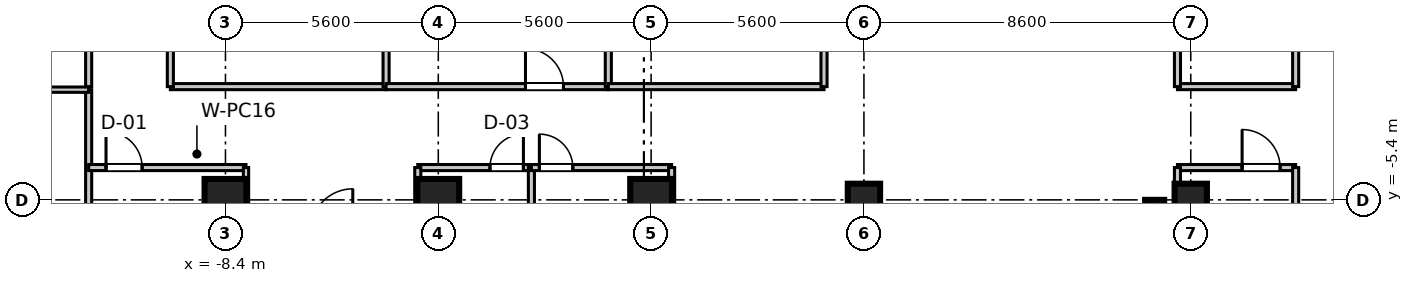
"""IFC4 building model, lengths in metres.
Left out: names, types, materials, properties, quantities, classifications, styles, units other than length and angle.
Written with IfcOpenShell. Run it as: python <this file> out.ifc"""

import sys

from ifc_helpers import new_model, si_unit, direction, frame, frame_2d, origin, origin_2d, place, context, subcontext, project, spatial, rectangle, extrude, source, transform, mapped, element, fill, save


model = new_model("IFC4")
c1 = context("Model", 3, precision=1e-05, world=origin(), true_north=direction((0.0, 1.0)))
c2 = subcontext(c1, "Body", "Model", "MODEL_VIEW")
j1 = project(units=[si_unit("LENGTHUNIT", "METRE"), si_unit("PLANEANGLEUNIT", "RADIAN")], contexts=[c1])
p1 = place(None, origin())
s1 = spatial("IfcSite", under=j1, at=p1, CompositionType="ELEMENT")
p2 = place(p1, origin())
s2 = spatial("IfcBuilding", under=s1, at=p2, CompositionType="ELEMENT")
p3 = place(p2, frame((0.0, 0.0, 156.3)))
s3 = spatial("IfcBuildingStorey", under=s2, at=p3, CompositionType="ELEMENT", Elevation=156.3)
m1 = source(origin(), c2, "Body", "SweptSolid", [
    extrude(rectangle(XDim=1.1, YDim=1.1, at=origin_2d()), origin(), (0.0, 0.0, 1.0), 3.605),
])
for number, where, z_axis, x_axis in (
    (1, (-8.4, -5.4, 0.0), (0.0, 0.0, 1.0), (1.0, 0.0, 0.0)),
    (2, (-2.8, -5.4, 0.0), (0.0, 0.0, 1.0), (1.0, 0.0, 0.0)),
    (3, (2.8, -5.4, 0.0), (0.0, 0.0, 1.0), (1.0, 0.0, 0.0)),
):
    element("IfcColumn", number, at=place(p3, frame(where, z_axis=z_axis, x_axis=x_axis)), inside=s3, PredefinedType="COLUMN", context=c2, shape_type="MappedRepresentation", body=[
        mapped(m1, transform((0.0, 0.0, 0.0), scale=1.0)),
    ])
m2 = source(origin(), c2, "Body", "SweptSolid", [
    extrude(rectangle(XDim=0.85, YDim=0.85, at=origin_2d()), origin(), (0.0, 0.0, 1.0), 3.605),
])
for number, where, z_axis, x_axis in (
    (4, (8.4, -5.4, 0.0), (0.0, 0.0, 1.0), (1.0, 0.0, 0.0)),
    (5, (17.0, -5.4, 0.0), (0.0, 0.0, 1.0), (1.0, 0.0, 0.0)),
):
    element("IfcColumn", number, at=place(p3, frame(where, z_axis=z_axis, x_axis=x_axis)), inside=s3, PredefinedType="PILASTER", context=c2, shape_type="MappedRepresentation", body=[
        mapped(m2, transform((0.0, 0.0, 0.0), scale=1.0)),
    ])
m3 = source(origin(), c2, "Body", "SweptSolid", [
    extrude(rectangle(XDim=11.6, YDim=0.5, at=frame_2d((5.8, 0.0))), origin(), (0.0, 0.0, 1.0), 3.39),
])
p4 = place(p3, frame((16.05, -17.0, 0.0), z_axis=(0.0, 0.0, 1.0), x_axis=(0.0, 1.0, 0.0)))
e6 = element("IfcWall", 6, at=p4, inside=s3, PredefinedType="SHEAR", context=c2, shape_type="MappedRepresentation", body=[
    mapped(m3, transform((0.0, 0.0, 0.0), scale=1.0)),
])
m4 = source(origin(), c2, "Body", "SweptSolid", [
    extrude(rectangle(XDim=3.11, YDim=0.16, at=frame_2d((1.555, 0.0))), origin(), (0.0, 0.0, 1.0), 2.73),
])
p5 = place(p3, frame((16.65, -4.55, 0.0), z_axis=(0.0, 0.0, 1.0), x_axis=(1.0, 0.0, 0.0)))
e7 = element("IfcWall", 7, at=p5, inside=s3, PredefinedType="PARTITIONING", context=c2, shape_type="MappedRepresentation", body=[
    mapped(m4, transform((0.0, 0.0, 0.0), scale=1.0)),
])
p6 = place(p5, frame((1.701, 0.0, 0.0)))
e8 = element("IfcOpeningElement", 8, at=p6, cuts=e7, PredefinedType="OPENING", context=c2, shape_type="SweptSolid", body=[
    extrude(rectangle(XDim=1.0, YDim=2.1, at=frame_2d((0.5, 1.05))), frame((0.0, 0.09, 0.0), z_axis=(0.0, -1.0, 0.0), x_axis=(1.0, 0.0, 0.0)), (0.0, 0.0, 1.0), 0.18),
])
m5 = source(origin(), c2, "Body", "SweptSolid", [
    extrude(rectangle(XDim=17.95, YDim=0.16, at=frame_2d((8.975, 0.0))), origin(), (0.0, 0.0, 1.0), 2.73),
])
p7 = place(p3, frame((16.65, -22.5, 0.0), z_axis=(0.0, 0.0, 1.0), x_axis=(0.0, 1.0, 0.0)))
e9 = element("IfcWall", 9, at=p7, inside=s3, PredefinedType="PARTITIONING", context=c2, shape_type="MappedRepresentation", body=[
    mapped(m5, transform((0.0, 0.0, 0.0), scale=1.0)),
])
m6 = source(origin(), c2, "Body", "SweptSolid", [
    extrude(rectangle(XDim=16.53, YDim=0.16, at=frame_2d((8.265, 0.0))), origin(), (0.0, 0.0, 1.0), 2.73),
])
p8 = place(p3, frame((19.76, -21.08, 0.0), z_axis=(0.0, 0.0, 1.0), x_axis=(0.0, 1.0, 0.0)))
e10 = element("IfcWall", 10, at=p8, inside=s3, PredefinedType="PARTITIONING", context=c2, shape_type="MappedRepresentation", body=[
    mapped(m6, transform((0.0, 0.0, 0.0), scale=1.0)),
])
m7 = source(origin(), c2, "Body", "SweptSolid", [
    extrude(rectangle(XDim=20.0, YDim=0.16, at=frame_2d((10.0, 0.0))), origin(), (0.0, 0.0, 1.0), 2.73),
])
p9 = place(p3, frame((-12.0, -22.5, 0.0), z_axis=(0.0, 0.0, 1.0), x_axis=(0.0, 1.0, 0.0)))
e11 = element("IfcWall", 11, at=p9, inside=s3, PredefinedType="PARTITIONING", context=c2, shape_type="MappedRepresentation", body=[
    mapped(m7, transform((0.0, 0.0, 0.0), scale=1.0)),
])
p10 = place(p9, frame((10.785, 0.0, 0.0)))
e12 = element("IfcOpeningElement", 12, at=p10, cuts=e11, PredefinedType="OPENING", context=c2, shape_type="SweptSolid", body=[
    extrude(rectangle(XDim=0.95, YDim=2.1, at=frame_2d((0.475, 1.05))), frame((0.0, 0.09, 0.0), z_axis=(0.0, -1.0, 0.0), x_axis=(1.0, 0.0, 0.0)), (0.0, 0.0, 1.0), 0.18),
])
m8 = source(origin(), c2, "Body", "SweptSolid", [
    extrude(rectangle(XDim=7.76, YDim=0.14, at=frame_2d((3.88, 0.0))), origin(), (0.0, 0.0, 1.0), 2.73),
])
p11 = place(p3, frame((-19.76, -2.5, 0.0), z_axis=(0.0, 0.0, 1.0), x_axis=(1.0, 0.0, 0.0)))
e13 = element("IfcWall", 13, at=p11, inside=s3, PredefinedType="PARTITIONING", context=c2, shape_type="MappedRepresentation", body=[
    mapped(m8, transform((0.0, 0.0, 0.0), scale=1.0)),
])
m9 = source(origin(), c2, "Body", "SweptSolid", [
    extrude(rectangle(XDim=4.14, YDim=0.16, at=frame_2d((2.07, 0.0))), origin(), (0.0, 0.0, 1.0), 2.73),
])
p12 = place(p3, frame((-12.0, -4.55, 0.0), z_axis=(0.0, 0.0, 1.0), x_axis=(1.0, 0.0, 0.0)))
e14 = element("IfcWall", 14, at=p12, inside=s3, PredefinedType="PARTITIONING", context=c2, shape_type="MappedRepresentation", body=[
    mapped(m9, transform((0.0, 0.0, 0.0), scale=1.0)),
])
p13 = place(p12, frame((0.457, 0.0, 0.0)))
e15 = element("IfcOpeningElement", 15, at=p13, cuts=e14, PredefinedType="OPENING", context=c2, shape_type="SweptSolid", body=[
    extrude(rectangle(XDim=0.95, YDim=2.1, at=frame_2d((0.475, 1.05))), frame((0.0, 0.09, 0.0), z_axis=(0.0, -1.0, 0.0), x_axis=(1.0, 0.0, 0.0)), (0.0, 0.0, 1.0), 0.18),
])
m10 = source(origin(), c2, "Body", "SweptSolid", [
    extrude(rectangle(XDim=17.95, YDim=0.14, at=frame_2d((8.975, 0.0))), origin(), (0.0, 0.0, 1.0), 2.73),
])
p14 = place(p3, frame((-7.86, -22.5, 0.0), z_axis=(0.0, 0.0, 1.0), x_axis=(0.0, 1.0, 0.0)))
e16 = element("IfcWall", 16, at=p14, inside=s3, PredefinedType="PARTITIONING", context=c2, shape_type="MappedRepresentation", body=[
    mapped(m10, transform((0.0, 0.0, 0.0), scale=1.0)),
])
m11 = source(origin(), c2, "Body", "SweptSolid", [
    extrude(rectangle(XDim=2.99, YDim=0.16, at=frame_2d((1.495, 0.0))), origin(), (0.0, 0.0, 1.0), 2.73),
])
p15 = place(p3, frame((-3.34, -4.55, 0.0), z_axis=(0.0, 0.0, 1.0), x_axis=(1.0, 0.0, 0.0)))
e17 = element("IfcWall", 17, at=p15, inside=s3, PredefinedType="PARTITIONING", context=c2, shape_type="MappedRepresentation", body=[
    mapped(m11, transform((0.0, 0.0, 0.0), scale=1.0)),
])
p16 = place(p15, frame((1.9, 0.0, 0.0)))
e18 = element("IfcOpeningElement", 18, at=p16, cuts=e17, PredefinedType="OPENING", context=c2, shape_type="SweptSolid", body=[
    extrude(rectangle(XDim=0.88, YDim=2.1, at=frame_2d((0.44, 1.05))), frame((0.0, 0.09, 0.0), z_axis=(0.0, -1.0, 0.0), x_axis=(1.0, 0.0, 0.0)), (0.0, 0.0, 1.0), 0.18),
])
for number, where, z_axis, x_axis in (
    (19, (-3.34, -22.5, 0.0), (0.0, 0.0, 1.0), (0.0, 1.0, 0.0)),
    (20, (-0.35, -22.5, 0.0), (0.0, 0.0, 1.0), (0.0, 1.0, 0.0)),
):
    element("IfcWall", number, at=place(p3, frame(where, z_axis=z_axis, x_axis=x_axis)), inside=s3, PredefinedType="PARTITIONING", context=c2, shape_type="MappedRepresentation", body=[
        mapped(m5, transform((0.0, 0.0, 0.0), scale=1.0)),
    ])
m12 = source(origin(), c2, "Body", "SweptSolid", [
    extrude(rectangle(XDim=3.69, YDim=0.16, at=frame_2d((1.845, 0.0))), origin(), (0.0, 0.0, 1.0), 2.73),
])
p17 = place(p3, frame((-0.35, -4.55, 0.0), z_axis=(0.0, 0.0, 1.0), x_axis=(1.0, 0.0, 0.0)))
e21 = element("IfcWall", 21, at=p17, inside=s3, PredefinedType="PARTITIONING", context=c2, shape_type="MappedRepresentation", body=[
    mapped(m12, transform((0.0, 0.0, 0.0), scale=1.0)),
])
p18 = place(p17, frame((0.21, 0.0, 0.0)))
e22 = element("IfcOpeningElement", 22, at=p18, cuts=e21, PredefinedType="OPENING", context=c2, shape_type="SweptSolid", body=[
    extrude(rectangle(XDim=0.88, YDim=2.1, at=frame_2d((0.44, 1.05))), frame((0.0, 0.09, 0.0), z_axis=(0.0, -1.0, 0.0), x_axis=(1.0, 0.0, 0.0)), (0.0, 0.0, 1.0), 0.18),
])
p19 = place(p3, frame((3.34, -22.5, 0.0), z_axis=(0.0, 0.0, 1.0), x_axis=(0.0, 1.0, 0.0)))
e23 = element("IfcWall", 23, at=p19, inside=s3, PredefinedType="PARTITIONING", context=c2, shape_type="MappedRepresentation", body=[
    mapped(m5, transform((0.0, 0.0, 0.0), scale=1.0)),
])
m13 = source(origin(), c2, "Body", "SweptSolid", [
    extrude(rectangle(XDim=4.84, YDim=0.16, at=frame_2d((2.42, 0.0))), origin(), (0.0, 0.0, 1.0), 2.73),
])
p20 = place(p3, frame((-12.0, -2.42, 0.0), z_axis=(0.0, 0.0, 1.0), x_axis=(0.0, 1.0, 0.0)))
e24 = element("IfcWall", 24, at=p20, inside=s3, PredefinedType="PARTITIONING", context=c2, shape_type="MappedRepresentation", body=[
    mapped(m13, transform((0.0, 0.0, 0.0), scale=1.0)),
])
p21 = place(p20, frame((1.945, 0.0, 0.0)))
e25 = element("IfcOpeningElement", 25, at=p21, cuts=e24, PredefinedType="OPENING", context=c2, shape_type="SweptSolid", body=[
    extrude(rectangle(XDim=0.95, YDim=2.1, at=frame_2d((0.475, 1.05))), frame((0.0, 0.09, 0.0), z_axis=(0.0, -1.0, 0.0), x_axis=(1.0, 0.0, 0.0)), (0.0, 0.0, 1.0), 0.18),
])
m14 = source(origin(), c2, "Body", "SweptSolid", [
    extrude(rectangle(XDim=5.676, YDim=0.16, at=frame_2d((2.838, 0.0))), origin(), (0.0, 0.0, 1.0), 2.73),
])
p22 = place(p3, frame((-9.85, -2.42, 0.0), z_axis=(0.0, 0.0, 1.0), x_axis=(1.0, 0.0, 0.0)))
e26 = element("IfcWall", 26, at=p22, inside=s3, PredefinedType="PARTITIONING", context=c2, shape_type="MappedRepresentation", body=[
    mapped(m14, transform((0.0, 0.0, 0.0), scale=1.0)),
])
for number, where, z_axis, x_axis in (
    (27, (-9.85, -2.42, 0.0), (0.0, 0.0, 1.0), (0.0, 1.0, 0.0)),
    (28, (-4.174, -2.42, 0.0), (0.0, 0.0, 1.0), (0.0, 1.0, 0.0)),
):
    element("IfcWall", number, at=place(p3, frame(where, z_axis=z_axis, x_axis=x_axis)), inside=s3, PredefinedType="PARTITIONING", context=c2, shape_type="MappedRepresentation", body=[
        mapped(m13, transform((0.0, 0.0, 0.0), scale=1.0)),
    ])
m15 = source(origin(), c2, "Body", "SweptSolid", [
    extrude(rectangle(XDim=5.848, YDim=0.16, at=frame_2d((2.924, 0.0))), origin(), (0.0, 0.0, 1.0), 2.73),
])
p23 = place(p3, frame((-4.174, -2.42, 0.0), z_axis=(0.0, 0.0, 1.0), x_axis=(1.0, 0.0, 0.0)))
e29 = element("IfcWall", 29, at=p23, inside=s3, PredefinedType="PARTITIONING", context=c2, shape_type="MappedRepresentation", body=[
    mapped(m15, transform((0.0, 0.0, 0.0), scale=1.0)),
])
p24 = place(p23, frame((3.668, 0.0, 0.0)))
e30 = element("IfcOpeningElement", 30, at=p24, cuts=e29, PredefinedType="OPENING", context=c2, shape_type="SweptSolid", body=[
    extrude(rectangle(XDim=1.0, YDim=2.1, at=frame_2d((0.5, 1.05))), frame((0.0, 0.09, 0.0), z_axis=(0.0, -1.0, 0.0), x_axis=(1.0, 0.0, 0.0)), (0.0, 0.0, 1.0), 0.18),
])
p25 = place(p3, frame((1.674, -2.42, 0.0), z_axis=(0.0, 0.0, 1.0), x_axis=(0.0, 1.0, 0.0)))
e31 = element("IfcWall", 31, at=p25, inside=s3, PredefinedType="PARTITIONING", context=c2, shape_type="MappedRepresentation", body=[
    mapped(m13, transform((0.0, 0.0, 0.0), scale=1.0)),
])
p26 = place(p3, frame((1.674, -2.42, 0.0), z_axis=(0.0, 0.0, 1.0), x_axis=(1.0, 0.0, 0.0)))
e32 = element("IfcWall", 32, at=p26, inside=s3, PredefinedType="PARTITIONING", context=c2, shape_type="MappedRepresentation", body=[
    mapped(m14, transform((0.0, 0.0, 0.0), scale=1.0)),
])
p27 = place(p3, frame((7.35, -2.42, 0.0), z_axis=(0.0, 0.0, 1.0), x_axis=(0.0, 1.0, 0.0)))
e33 = element("IfcWall", 33, at=p27, inside=s3, PredefinedType="PARTITIONING", context=c2, shape_type="MappedRepresentation", body=[
    mapped(m13, transform((0.0, 0.0, 0.0), scale=1.0)),
])
p28 = place(p3, frame((16.65, -2.42, 0.0), z_axis=(0.0, 0.0, 1.0), x_axis=(1.0, 0.0, 0.0)))
e34 = element("IfcWall", 34, at=p28, inside=s3, PredefinedType="PARTITIONING", context=c2, shape_type="MappedRepresentation", body=[
    mapped(m4, transform((0.0, 0.0, 0.0), scale=1.0)),
])
for number, where, z_axis, x_axis in (
    (35, (16.65, -2.42, 0.0), (0.0, 0.0, 1.0), (0.0, 1.0, 0.0)),
    (36, (19.76, -2.42, 0.0), (0.0, 0.0, 1.0), (0.0, 1.0, 0.0)),
):
    element("IfcWall", number, at=place(p3, frame(where, z_axis=z_axis, x_axis=x_axis)), inside=s3, PredefinedType="PARTITIONING", context=c2, shape_type="MappedRepresentation", body=[
        mapped(m13, transform((0.0, 0.0, 0.0), scale=1.0)),
    ])
m16 = source(origin(), c2, "Body", "SweptSolid", [
    extrude(rectangle(XDim=1.0, YDim=2.1, at=frame_2d((0.5, 1.05))), frame((0.0, 0.025, 0.0), z_axis=(0.0, -1.0, 0.0), x_axis=(1.0, 0.0, 0.0)), (0.0, 0.0, 1.0), 0.05),
])
p29 = place(p6, frame((1.0, 0.0, 0.0), z_axis=(0.0, 0.0, 1.0), x_axis=(-1.0, 0.0, 0.0)))
e37 = element("IfcDoor", 37, at=p29, inside=s3, OperationType="SINGLE_SWING_LEFT", PredefinedType="DOOR", context=c2, shape_type="MappedRepresentation", body=[
    mapped(m16, transform((0.0, 0.0, 0.0), scale=1.0)),
])
fill(e8, e37)
m17 = source(origin(), c2, "Body", "SweptSolid", [
    extrude(rectangle(XDim=0.95, YDim=2.1, at=frame_2d((0.475, 1.05))), frame((0.0, 0.025, 0.0), z_axis=(0.0, -1.0, 0.0), x_axis=(1.0, 0.0, 0.0)), (0.0, 0.0, 1.0), 0.05),
])
p30 = place(p13, frame((0.95, 0.0, 0.0), z_axis=(0.0, 0.0, 1.0), x_axis=(-1.0, 0.0, 0.0)))
e38 = element("IfcDoor", 38, at=p30, inside=s3, OperationType="SINGLE_SWING_LEFT", PredefinedType="DOOR", context=c2, shape_type="MappedRepresentation", body=[
    mapped(m17, transform((0.0, 0.0, 0.0), scale=1.0)),
])
fill(e15, e38)
m18 = source(origin(), c2, "Body", "SweptSolid", [
    extrude(rectangle(XDim=0.88, YDim=2.1, at=frame_2d((0.44, 1.05))), frame((0.0, 0.025, 0.0), z_axis=(0.0, -1.0, 0.0), x_axis=(1.0, 0.0, 0.0)), (0.0, 0.0, 1.0), 0.05),
])
p31 = place(p16, frame((0.88, 0.0, 0.0), z_axis=(0.0, 0.0, 1.0), x_axis=(-1.0, 0.0, 0.0)))
e39 = element("IfcDoor", 39, at=p31, inside=s3, OperationType="SINGLE_SWING_RIGHT", PredefinedType="DOOR", context=c2, shape_type="MappedRepresentation", body=[
    mapped(m18, transform((0.0, 0.0, 0.0), scale=1.0)),
])
fill(e18, e39)
p32 = place(p18, frame((0.88, 0.0, 0.0), z_axis=(0.0, 0.0, 1.0), x_axis=(-1.0, 0.0, 0.0)))
e40 = element("IfcDoor", 40, at=p32, inside=s3, OperationType="SINGLE_SWING_LEFT", PredefinedType="DOOR", context=c2, shape_type="MappedRepresentation", body=[
    mapped(m18, transform((0.0, 0.0, 0.0), scale=1.0)),
])
fill(e22, e40)
p33 = place(p24, origin())
e41 = element("IfcDoor", 41, at=p33, inside=s3, OperationType="SINGLE_SWING_LEFT", PredefinedType="DOOR", context=c2, shape_type="MappedRepresentation", body=[
    mapped(m16, transform((0.0, 0.0, 0.0), scale=1.0)),
])
fill(e30, e41)
save(model, sys.argv[1])
